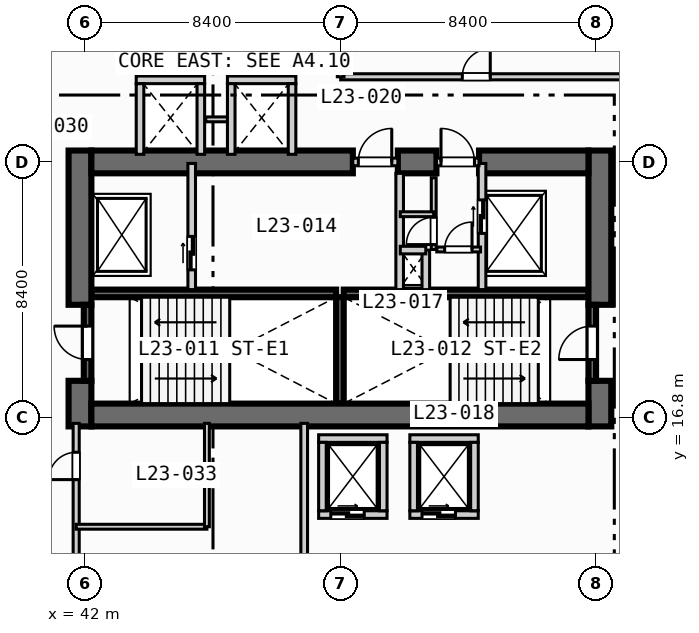
"""IFC4 building model, lengths in metres.
Left out: names, types, materials, properties, quantities, classifications, styles, units other than length and angle.
Written with IfcOpenShell. Run it as: python <this file> out.ifc"""

import sys

from ifc_helpers import new_model, si_unit, direction, frame, frame_2d, origin, place, context, subcontext, project, spatial, rectangle, extrude, element, fill, save


model = new_model("IFC4")
c1 = context("Model", 3, precision=1e-05, world=origin(), true_north=direction((0.0, 1.0)))
c2 = subcontext(c1, "Body", "Model", "MODEL_VIEW")
j1 = project(units=[si_unit("LENGTHUNIT", "METRE"), si_unit("PLANEANGLEUNIT", "RADIAN")], contexts=[c1])
p1 = place(None, origin())
s1 = spatial("IfcSite", under=j1, at=p1, CompositionType="ELEMENT")
p2 = place(p1, origin())
s2 = spatial("IfcBuilding", under=s1, at=p2, CompositionType="ELEMENT")
p3 = place(p2, frame((0.0, 0.0, 100.0)))
s3 = spatial("IfcBuildingStorey", under=s2, at=p3, CompositionType="ELEMENT", Elevation=100.0)
for number, where, z_axis, x_axis in (
    (1, (42.2, 20.875, 0.0), (0.0, 0.0, 1.0), (1.0, 0.0, 0.0)),
    (2, (50.5, 20.875, 0.0), (0.0, 0.0, 1.0), (1.0, 0.0, 0.0)),
):
    element("IfcWall", number, at=place(p3, frame(where, z_axis=z_axis, x_axis=x_axis)), inside=s3, PredefinedType="SOLIDWALL", context=c2, shape_type="SweptSolid", body=[
        extrude(rectangle(XDim=8.05, YDim=0.25, at=frame_2d((4.025, 0.0))), origin(), (0.0, 0.0, 1.0), 3.55),
    ])
p4 = place(p3, frame((50.375, 17.25, 0.0), z_axis=(0.0, 0.0, 1.0), x_axis=(0.0, 1.0, 0.0)))
e3 = element("IfcWall", 3, at=p4, inside=s3, PredefinedType="SOLIDWALL", context=c2, shape_type="SweptSolid", body=[
    extrude(rectangle(XDim=3.5, YDim=0.25, at=frame_2d((1.75, 0.0))), origin(), (0.0, 0.0, 1.0), 3.55),
])
p5 = place(p3, frame((41.825, 16.5, 0.0), z_axis=(0.0, 0.0, 1.0), x_axis=(0.0, 1.0, 0.0)))
e4 = element("IfcWall", 4, at=p5, inside=s3, PredefinedType="SHEAR", context=c2, shape_type="SweptSolid", body=[
    extrude(rectangle(XDim=1.5, YDim=0.75, at=frame_2d((0.75, 0.0))), origin(), (0.0, 0.0, 1.0), 3.55),
])
p6 = place(p3, frame((41.825, 20.5, 0.0), z_axis=(0.0, 0.0, 1.0), x_axis=(0.0, 1.0, 0.0)))
e5 = element("IfcWall", 5, at=p6, inside=s3, PredefinedType="SHEAR", context=c2, shape_type="SweptSolid", body=[
    extrude(rectangle(XDim=5.075, YDim=0.75, at=frame_2d((2.538, 0.0))), origin(), (0.0, 0.0, 1.0), 3.55),
])
p7 = place(p3, frame((58.925, 16.5, 0.0), z_axis=(0.0, 0.0, 1.0), x_axis=(0.0, 1.0, 0.0)))
e6 = element("IfcWall", 6, at=p7, inside=s3, PredefinedType="SHEAR", context=c2, shape_type="SweptSolid", body=[
    extrude(rectangle(XDim=1.5, YDim=0.75, at=frame_2d((0.75, 0.0))), origin(), (0.0, 0.0, 1.0), 3.55),
])
p8 = place(p3, frame((58.925, 20.5, 0.0), z_axis=(0.0, 0.0, 1.0), x_axis=(0.0, 1.0, 0.0)))
e7 = element("IfcWall", 7, at=p8, inside=s3, PredefinedType="SHEAR", context=c2, shape_type="SweptSolid", body=[
    extrude(rectangle(XDim=5.075, YDim=0.75, at=frame_2d((2.538, 0.0))), origin(), (0.0, 0.0, 1.0), 3.55),
])
p9 = place(p3, frame((42.2, 16.875, 0.0), z_axis=(0.0, 0.0, 1.0), x_axis=(1.0, 0.0, 0.0)))
e8 = element("IfcWall", 8, at=p9, inside=s3, PredefinedType="SHEAR", context=c2, shape_type="SweptSolid", body=[
    extrude(rectangle(XDim=16.35, YDim=0.75, at=frame_2d((8.175, 0.0))), origin(), (0.0, 0.0, 1.0), 3.55),
])
p10 = place(p3, frame((42.2, 25.2, 0.0), z_axis=(0.0, 0.0, 1.0), x_axis=(1.0, 0.0, 0.0)))
e9 = element("IfcWall", 9, at=p10, inside=s3, PredefinedType="SHEAR", context=c2, shape_type="SweptSolid", body=[
    extrude(rectangle(XDim=8.6, YDim=0.75, at=frame_2d((4.3, 0.0))), origin(), (0.0, 0.0, 1.0), 3.55),
])
p11 = place(p3, frame((52.28, 25.2, 0.0), z_axis=(0.0, 0.0, 1.0), x_axis=(1.0, 0.0, 0.0)))
e10 = element("IfcWall", 10, at=p11, inside=s3, PredefinedType="SHEAR", context=c2, shape_type="SweptSolid", body=[
    extrude(rectangle(XDim=1.27, YDim=0.75, at=frame_2d((0.635, 0.0))), origin(), (0.0, 0.0, 1.0), 3.55),
])
p12 = place(p3, frame((54.95, 25.2, 0.0), z_axis=(0.0, 0.0, 1.0), x_axis=(1.0, 0.0, 0.0)))
e11 = element("IfcWall", 11, at=p12, inside=s3, PredefinedType="SHEAR", context=c2, shape_type="SweptSolid", body=[
    extrude(rectangle(XDim=3.6, YDim=0.75, at=frame_2d((1.8, 0.0))), origin(), (0.0, 0.0, 1.0), 3.55),
])
p13 = place(p3, frame((42.075, 18.0, 0.0), z_axis=(0.0, 0.0, 1.0), x_axis=(0.0, 1.0, 0.0)))
e12 = element("IfcWall", 12, at=p13, inside=s3, PredefinedType="SOLIDWALL", context=c2, shape_type="SweptSolid", body=[
    extrude(rectangle(XDim=2.5, YDim=0.25, at=frame_2d((1.25, 0.0))), origin(), (0.0, 0.0, 1.0), 3.55),
])
p14 = place(p13, frame((0.7, 0.0, 0.0)))
e13 = element("IfcOpeningElement", 13, at=p14, cuts=e12, PredefinedType="OPENING", context=c2, shape_type="SweptSolid", body=[
    extrude(rectangle(XDim=1.1, YDim=2.15, at=frame_2d((0.55, 1.075))), frame((0.0, 0.135, 0.0), z_axis=(0.0, -1.0, 0.0), x_axis=(1.0, 0.0, 0.0)), (0.0, 0.0, 1.0), 0.27),
])
p15 = place(p3, frame((58.675, 18.0, 0.0), z_axis=(0.0, 0.0, 1.0), x_axis=(0.0, 1.0, 0.0)))
e14 = element("IfcWall", 14, at=p15, inside=s3, PredefinedType="SOLIDWALL", context=c2, shape_type="SweptSolid", body=[
    extrude(rectangle(XDim=2.5, YDim=0.25, at=frame_2d((1.25, 0.0))), origin(), (0.0, 0.0, 1.0), 3.55),
])
p16 = place(p15, frame((0.7, 0.0, 0.0)))
e15 = element("IfcOpeningElement", 15, at=p16, cuts=e14, PredefinedType="OPENING", context=c2, shape_type="SweptSolid", body=[
    extrude(rectangle(XDim=1.1, YDim=2.15, at=frame_2d((0.55, 1.075))), frame((0.0, 0.135, 0.0), z_axis=(0.0, -1.0, 0.0), x_axis=(1.0, 0.0, 0.0)), (0.0, 0.0, 1.0), 0.27),
])
p17 = place(p3, frame((45.5, 21.0, 0.0), z_axis=(0.0, 0.0, 1.0), x_axis=(0.0, 1.0, 0.0)))
e16 = element("IfcWall", 16, at=p17, inside=s3, PredefinedType="SOLIDWALL", context=c2, shape_type="SweptSolid", body=[
    extrude(rectangle(XDim=4.15, YDim=0.25, at=frame_2d((2.075, 0.0))), origin(), (0.0, 0.0, 1.0), 3.55),
])
p18 = place(p17, frame((0.65, 0.0, 0.0)))
e17 = element("IfcOpeningElement", 17, at=p18, cuts=e16, PredefinedType="OPENING", context=c2, shape_type="SweptSolid", body=[
    extrude(rectangle(XDim=1.1, YDim=2.15, at=frame_2d((0.55, 1.075))), frame((0.0, 0.135, 0.0), z_axis=(0.0, -1.0, 0.0), x_axis=(1.0, 0.0, 0.0)), (0.0, 0.0, 1.0), 0.27),
])
p19 = place(p3, frame((50.8, 25.2, 0.0), z_axis=(0.0, 0.0, 1.0), x_axis=(1.0, 0.0, 0.0)))
e18 = element("IfcWall", 18, at=p19, inside=s3, PredefinedType="SOLIDWALL", context=c2, shape_type="SweptSolid", body=[
    extrude(rectangle(XDim=1.48, YDim=0.25, at=frame_2d((0.74, 0.0))), origin(), (0.0, 0.0, 1.0), 3.55),
])
p20 = place(p19, frame((0.18, 0.0, 0.0)))
e19 = element("IfcOpeningElement", 19, at=p20, cuts=e18, PredefinedType="OPENING", context=c2, shape_type="SweptSolid", body=[
    extrude(rectangle(XDim=1.1, YDim=2.15, at=frame_2d((0.55, 1.075))), frame((0.0, 0.135, 0.0), z_axis=(0.0, -1.0, 0.0), x_axis=(1.0, 0.0, 0.0)), (0.0, 0.0, 1.0), 0.27),
])
p21 = place(p3, frame((52.34, 21.0, 0.0), z_axis=(0.0, 0.0, 1.0), x_axis=(0.0, 1.0, 0.0)))
e20 = element("IfcWall", 20, at=p21, inside=s3, PredefinedType="SOLIDWALL", context=c2, shape_type="SweptSolid", body=[
    extrude(rectangle(XDim=3.825, YDim=0.25, at=frame_2d((1.913, 0.0))), origin(), (0.0, 0.0, 1.0), 3.55),
])
p22 = place(p3, frame((55.05, 21.0, 0.0), z_axis=(0.0, 0.0, 1.0), x_axis=(0.0, 1.0, 0.0)))
e21 = element("IfcWall", 21, at=p22, inside=s3, PredefinedType="SOLIDWALL", context=c2, shape_type="SweptSolid", body=[
    extrude(rectangle(XDim=4.15, YDim=0.25, at=frame_2d((2.075, 0.0))), origin(), (0.0, 0.0, 1.0), 3.55),
])
p23 = place(p22, frame((1.85, 0.0, 0.0)))
e22 = element("IfcOpeningElement", 22, at=p23, cuts=e21, PredefinedType="OPENING", context=c2, shape_type="SweptSolid", body=[
    extrude(rectangle(XDim=1.1, YDim=2.15, at=frame_2d((0.55, 1.075))), frame((0.0, 0.135, 0.0), z_axis=(0.0, -1.0, 0.0), x_axis=(1.0, 0.0, 0.0)), (0.0, 0.0, 1.0), 0.27),
])
p24 = place(p3, frame((53.55, 25.2, 0.0), z_axis=(0.0, 0.0, 1.0), x_axis=(1.0, 0.0, 0.0)))
e23 = element("IfcWall", 23, at=p24, inside=s3, PredefinedType="SOLIDWALL", context=c2, shape_type="SweptSolid", body=[
    extrude(rectangle(XDim=1.4, YDim=0.25, at=frame_2d((0.7, 0.0))), origin(), (0.0, 0.0, 1.0), 3.55),
])
p25 = place(p24, frame((0.15, 0.0, 0.0)))
e24 = element("IfcOpeningElement", 24, at=p25, cuts=e23, PredefinedType="OPENING", context=c2, shape_type="SweptSolid", body=[
    extrude(rectangle(XDim=1.1, YDim=2.15, at=frame_2d((0.55, 1.075))), frame((0.0, 0.135, 0.0), z_axis=(0.0, -1.0, 0.0), x_axis=(1.0, 0.0, 0.0)), (0.0, 0.0, 1.0), 0.27),
])
p26 = place(p3, frame((53.2, 21.0, 0.0), z_axis=(0.0, 0.0, 1.0), x_axis=(0.0, 1.0, 0.0)))
e25 = element("IfcWall", 25, at=p26, inside=s3, PredefinedType="SOLIDWALL", context=c2, shape_type="SweptSolid", body=[
    extrude(rectangle(XDim=1.3, YDim=0.25, at=frame_2d((0.65, 0.0))), origin(), (0.0, 0.0, 1.0), 3.55),
])
p27 = place(p3, frame((52.36, 22.3, 0.0), z_axis=(0.0, 0.0, 1.0), x_axis=(1.0, 0.0, 0.0)))
e26 = element("IfcWall", 26, at=p27, inside=s3, PredefinedType="SOLIDWALL", context=c2, shape_type="SweptSolid", body=[
    extrude(rectangle(XDim=0.84, YDim=0.25, at=frame_2d((0.42, 0.0))), origin(), (0.0, 0.0, 1.0), 3.55),
])
p28 = place(p3, frame((53.56, 22.32, 0.0), z_axis=(0.0, 0.0, 1.0), x_axis=(1.0, 0.0, 0.0)))
e27 = element("IfcWall", 27, at=p28, inside=s3, PredefinedType="PARTITIONING", context=c2, shape_type="SweptSolid", body=[
    extrude(rectangle(XDim=1.44, YDim=0.16, at=frame_2d((0.72, 0.0))), origin(), (0.0, 0.0, 1.0), 3.55),
])
p29 = place(p28, frame((0.26, 0.0, 0.0)))
e28 = element("IfcOpeningElement", 28, at=p29, cuts=e27, PredefinedType="OPENING", context=c2, shape_type="SweptSolid", body=[
    extrude(rectangle(XDim=0.9, YDim=2.1, at=frame_2d((0.45, 1.05))), frame((0.0, 0.09, 0.0), z_axis=(0.0, -1.0, 0.0), x_axis=(1.0, 0.0, 0.0)), (0.0, 0.0, 1.0), 0.18),
])
p30 = place(p3, frame((53.46, 22.32, 0.0), z_axis=(0.0, 0.0, 1.0), x_axis=(0.0, 1.0, 0.0)))
e29 = element("IfcWall", 29, at=p30, inside=s3, PredefinedType="PARTITIONING", context=c2, shape_type="SweptSolid", body=[
    extrude(rectangle(XDim=2.36, YDim=0.16, at=frame_2d((1.18, 0.0))), origin(), (0.0, 0.0, 1.0), 3.55),
])
p31 = place(p30, frame((0.16, 0.0, 0.0)))
e30 = element("IfcOpeningElement", 30, at=p31, cuts=e29, PredefinedType="OPENING", context=c2, shape_type="SweptSolid", body=[
    extrude(rectangle(XDim=0.9, YDim=2.1, at=frame_2d((0.45, 1.05))), frame((0.0, 0.09, 0.0), z_axis=(0.0, -1.0, 0.0), x_axis=(1.0, 0.0, 0.0)), (0.0, 0.0, 1.0), 0.18),
])
p32 = place(p3, frame((52.36, 23.48, 0.0), z_axis=(0.0, 0.0, 1.0), x_axis=(1.0, 0.0, 0.0)))
e31 = element("IfcWall", 31, at=p32, inside=s3, PredefinedType="PARTITIONING", context=c2, shape_type="SweptSolid", body=[
    extrude(rectangle(XDim=1.1, YDim=0.16, at=frame_2d((0.55, 0.0))), origin(), (0.0, 0.0, 1.0), 3.55),
])
p33 = place(p3, frame((49.675, 13.6, 0.0), z_axis=(0.0, 0.0, 1.0), x_axis=(1.0, 0.0, 0.0)))
e32 = element("IfcWall", 32, at=p33, inside=s3, PredefinedType="SOLIDWALL", context=c2, shape_type="SweptSolid", body=[
    extrude(rectangle(XDim=2.25, YDim=0.25, at=frame_2d((1.125, 0.0))), origin(), (0.0, 0.0, 1.0), 3.55),
])
p34 = place(p33, frame((0.4, 0.0, 0.0)))
e33 = element("IfcOpeningElement", 33, at=p34, cuts=e32, PredefinedType="OPENING", context=c2, shape_type="SweptSolid", body=[
    extrude(rectangle(XDim=1.1, YDim=2.15, at=frame_2d((0.55, 1.075))), frame((0.0, 0.135, 0.0), z_axis=(0.0, -1.0, 0.0), x_axis=(1.0, 0.0, 0.0)), (0.0, 0.0, 1.0), 0.27),
])
for number, where, z_axis, x_axis in (
    (34, (49.675, 16.1, 0.0), (0.0, 0.0, 1.0), (1.0, 0.0, 0.0)),
    (35, (49.8, 13.725, 0.0), (0.0, 0.0, 1.0), (0.0, 1.0, 0.0)),
    (36, (51.8, 13.725, 0.0), (0.0, 0.0, 1.0), (0.0, 1.0, 0.0)),
):
    element("IfcWall", number, at=place(p3, frame(where, z_axis=z_axis, x_axis=x_axis)), inside=s3, PredefinedType="SOLIDWALL", context=c2, shape_type="SweptSolid", body=[
        extrude(rectangle(XDim=2.25, YDim=0.25, at=frame_2d((1.125, 0.0))), origin(), (0.0, 0.0, 1.0), 3.55),
    ])
p35 = place(p3, frame((52.675, 13.6, 0.0), z_axis=(0.0, 0.0, 1.0), x_axis=(1.0, 0.0, 0.0)))
e37 = element("IfcWall", 37, at=p35, inside=s3, PredefinedType="SOLIDWALL", context=c2, shape_type="SweptSolid", body=[
    extrude(rectangle(XDim=2.25, YDim=0.25, at=frame_2d((1.125, 0.0))), origin(), (0.0, 0.0, 1.0), 3.55),
])
p36 = place(p35, frame((0.4, 0.0, 0.0)))
e38 = element("IfcOpeningElement", 38, at=p36, cuts=e37, PredefinedType="OPENING", context=c2, shape_type="SweptSolid", body=[
    extrude(rectangle(XDim=1.1, YDim=2.15, at=frame_2d((0.55, 1.075))), frame((0.0, 0.135, 0.0), z_axis=(0.0, -1.0, 0.0), x_axis=(1.0, 0.0, 0.0)), (0.0, 0.0, 1.0), 0.27),
])
for number, where, z_axis, x_axis in (
    (39, (52.675, 16.1, 0.0), (0.0, 0.0, 1.0), (1.0, 0.0, 0.0)),
    (40, (52.8, 13.725, 0.0), (0.0, 0.0, 1.0), (0.0, 1.0, 0.0)),
    (41, (54.8, 13.725, 0.0), (0.0, 0.0, 1.0), (0.0, 1.0, 0.0)),
    (42, (43.675, 27.9, 0.0), (0.0, 0.0, 1.0), (1.0, 0.0, 0.0)),
):
    element("IfcWall", number, at=place(p3, frame(where, z_axis=z_axis, x_axis=x_axis)), inside=s3, PredefinedType="SOLIDWALL", context=c2, shape_type="SweptSolid", body=[
        extrude(rectangle(XDim=2.25, YDim=0.25, at=frame_2d((1.125, 0.0))), origin(), (0.0, 0.0, 1.0), 3.55),
    ])
for number, where, z_axis, x_axis in (
    (43, (43.8, 25.45, 0.0), (0.0, 0.0, 1.0), (0.0, 1.0, 0.0)),
    (44, (45.8, 25.45, 0.0), (0.0, 0.0, 1.0), (0.0, 1.0, 0.0)),
):
    element("IfcWall", number, at=place(p3, frame(where, z_axis=z_axis, x_axis=x_axis)), inside=s3, PredefinedType="SOLIDWALL", context=c2, shape_type="SweptSolid", body=[
        extrude(rectangle(XDim=2.325, YDim=0.25, at=frame_2d((1.163, 0.0))), origin(), (0.0, 0.0, 1.0), 3.55),
    ])
p37 = place(p3, frame((45.96, 26.6, 0.0), z_axis=(0.0, 0.0, 1.0), x_axis=(1.0, 0.0, 0.0)))
e45 = element("IfcWall", 45, at=p37, inside=s3, PredefinedType="PARTITIONING", context=c2, shape_type="SweptSolid", body=[
    extrude(rectangle(XDim=0.88, YDim=0.16, at=frame_2d((0.44, 0.0))), origin(), (0.0, 0.0, 1.0), 3.55),
])
p38 = place(p3, frame((46.675, 27.9, 0.0), z_axis=(0.0, 0.0, 1.0), x_axis=(1.0, 0.0, 0.0)))
e46 = element("IfcWall", 46, at=p38, inside=s3, PredefinedType="SOLIDWALL", context=c2, shape_type="SweptSolid", body=[
    extrude(rectangle(XDim=2.25, YDim=0.25, at=frame_2d((1.125, 0.0))), origin(), (0.0, 0.0, 1.0), 3.55),
])
for number, where, z_axis, x_axis in (
    (47, (46.8, 25.45, 0.0), (0.0, 0.0, 1.0), (0.0, 1.0, 0.0)),
    (48, (48.8, 25.45, 0.0), (0.0, 0.0, 1.0), (0.0, 1.0, 0.0)),
):
    element("IfcWall", number, at=place(p3, frame(where, z_axis=z_axis, x_axis=x_axis)), inside=s3, PredefinedType="SOLIDWALL", context=c2, shape_type="SweptSolid", body=[
        extrude(rectangle(XDim=2.325, YDim=0.25, at=frame_2d((1.163, 0.0))), origin(), (0.0, 0.0, 1.0), 3.55),
    ])
p39 = place(p3, frame((41.7, 0.35, 0.0), z_axis=(0.0, 0.0, 1.0), x_axis=(0.0, 1.0, 0.0)))
e49 = element("IfcWall", 49, at=p39, inside=s3, PredefinedType="PARTITIONING", context=c2, shape_type="SweptSolid", body=[
    extrude(rectangle(XDim=16.25, YDim=0.2, at=frame_2d((8.125, 0.0))), origin(), (0.0, 0.0, 1.0), 2.8),
])
p40 = place(p39, frame((5.0, 0.0, 0.0)))
e50 = element("IfcOpeningElement", 50, at=p40, cuts=e49, PredefinedType="OPENING", context=c2, shape_type="SweptSolid", body=[
    extrude(rectangle(XDim=0.92, YDim=2.1, at=frame_2d((0.46, 1.05))), frame((0.0, 0.11, 0.0), z_axis=(0.0, -1.0, 0.0), x_axis=(1.0, 0.0, 0.0)), (0.0, 0.0, 1.0), 0.22),
])
p41 = place(p39, frame((14.4, 0.0, 0.0)))
e51 = element("IfcOpeningElement", 51, at=p41, cuts=e49, PredefinedType="OPENING", context=c2, shape_type="SweptSolid", body=[
    extrude(rectangle(XDim=0.9, YDim=2.1, at=frame_2d((0.45, 1.05))), frame((0.0, 0.11, 0.0), z_axis=(0.0, -1.0, 0.0), x_axis=(1.0, 0.0, 0.0)), (0.0, 0.0, 1.0), 0.22),
])
p42 = place(p3, frame((49.2, 0.35, 0.0), z_axis=(0.0, 0.0, 1.0), x_axis=(0.0, 1.0, 0.0)))
e52 = element("IfcWall", 52, at=p42, inside=s3, PredefinedType="PARTITIONING", context=c2, shape_type="SweptSolid", body=[
    extrude(rectangle(XDim=16.25, YDim=0.22, at=frame_2d((8.125, 0.0))), origin(), (0.0, 0.0, 1.0), 3.55),
])
p43 = place(p3, frame((41.7, 13.2, 0.0), z_axis=(0.0, 0.0, 1.0), x_axis=(1.0, 0.0, 0.0)))
e53 = element("IfcWall", 53, at=p43, inside=s3, PredefinedType="PARTITIONING", context=c2, shape_type="SweptSolid", body=[
    extrude(rectangle(XDim=4.3, YDim=0.16, at=frame_2d((2.15, 0.0))), origin(), (0.0, 0.0, 1.0), 3.55),
])
p44 = place(p3, frame((46.0, 13.2, 0.0), z_axis=(0.0, 0.0, 1.0), x_axis=(0.0, 1.0, 0.0)))
e54 = element("IfcWall", 54, at=p44, inside=s3, PredefinedType="PARTITIONING", context=c2, shape_type="SweptSolid", body=[
    extrude(rectangle(XDim=3.4, YDim=0.16, at=frame_2d((1.7, 0.0))), origin(), (0.0, 0.0, 1.0), 3.55),
])
p45 = place(p3, frame((50.4, 28.0, 0.0), z_axis=(0.0, 0.0, 1.0), x_axis=(1.0, 0.0, 0.0)))
e55 = element("IfcWall", 55, at=p45, inside=s3, PredefinedType="PARTITIONING", context=c2, shape_type="SweptSolid", body=[
    extrude(rectangle(XDim=21.8, YDim=0.2, at=frame_2d((10.9, 0.0))), origin(), (0.0, 0.0, 1.0), 3.55),
])
p46 = place(p45, frame((4.0, 0.0, 0.0)))
e56 = element("IfcOpeningElement", 56, at=p46, cuts=e55, PredefinedType="OPENING", context=c2, shape_type="SweptSolid", body=[
    extrude(rectangle(XDim=0.92, YDim=2.1, at=frame_2d((0.46, 1.05))), frame((0.0, 0.11, 0.0), z_axis=(0.0, -1.0, 0.0), x_axis=(1.0, 0.0, 0.0)), (0.0, 0.0, 1.0), 0.22),
])
p47 = place(p3, frame((50.4, 28.0, 0.0), z_axis=(0.0, 0.0, 1.0), x_axis=(0.0, 1.0, 0.0)))
e57 = element("IfcWall", 57, at=p47, inside=s3, PredefinedType="PARTITIONING", context=c2, shape_type="SweptSolid", body=[
    extrude(rectangle(XDim=5.3, YDim=0.22, at=frame_2d((2.65, 0.0))), origin(), (0.0, 0.0, 1.0), 3.087),
])
p48 = place(p14, origin())
e58 = element("IfcDoor", 58, at=p48, inside=s3, OperationType="SINGLE_SWING_RIGHT", PredefinedType="DOOR", context=c2, shape_type="SweptSolid", body=[
    extrude(rectangle(XDim=1.1, YDim=2.15, at=frame_2d((0.55, 1.075))), frame((0.0, 0.025, 0.0), z_axis=(0.0, -1.0, 0.0), x_axis=(1.0, 0.0, 0.0)), (0.0, 0.0, 1.0), 0.05),
])
fill(e13, e58)
p49 = place(p16, origin())
e59 = element("IfcDoor", 59, at=p49, inside=s3, OperationType="SINGLE_SWING_LEFT", PredefinedType="DOOR", context=c2, shape_type="SweptSolid", body=[
    extrude(rectangle(XDim=1.1, YDim=2.15, at=frame_2d((0.55, 1.075))), frame((0.0, 0.025, 0.0), z_axis=(0.0, -1.0, 0.0), x_axis=(1.0, 0.0, 0.0)), (0.0, 0.0, 1.0), 0.05),
])
fill(e15, e59)
p50 = place(p18, origin())
e60 = element("IfcDoor", 60, at=p50, inside=s3, OperationType="SLIDING_TO_LEFT", PredefinedType="DOOR", context=c2, shape_type="SweptSolid", body=[
    extrude(rectangle(XDim=1.1, YDim=2.15, at=frame_2d((0.55, 1.075))), frame((0.0, 0.025, 0.0), z_axis=(0.0, -1.0, 0.0), x_axis=(1.0, 0.0, 0.0)), (0.0, 0.0, 1.0), 0.05),
])
fill(e17, e60)
p51 = place(p20, origin())
e61 = element("IfcDoor", 61, at=p51, inside=s3, OperationType="SINGLE_SWING_RIGHT", PredefinedType="DOOR", context=c2, shape_type="SweptSolid", body=[
    extrude(rectangle(XDim=1.1, YDim=2.15, at=frame_2d((0.55, 1.075))), frame((0.0, 0.025, 0.0), z_axis=(0.0, -1.0, 0.0), x_axis=(1.0, 0.0, 0.0)), (0.0, 0.0, 1.0), 0.05),
])
fill(e19, e61)
p52 = place(p23, origin())
e62 = element("IfcDoor", 62, at=p52, inside=s3, OperationType="SLIDING_TO_LEFT", PredefinedType="DOOR", context=c2, shape_type="SweptSolid", body=[
    extrude(rectangle(XDim=1.1, YDim=2.15, at=frame_2d((0.55, 1.075))), frame((0.0, 0.025, 0.0), z_axis=(0.0, -1.0, 0.0), x_axis=(1.0, 0.0, 0.0)), (0.0, 0.0, 1.0), 0.05),
])
fill(e22, e62)
p53 = place(p25, origin())
e63 = element("IfcDoor", 63, at=p53, inside=s3, OperationType="SINGLE_SWING_LEFT", PredefinedType="DOOR", context=c2, shape_type="SweptSolid", body=[
    extrude(rectangle(XDim=1.1, YDim=2.15, at=frame_2d((0.55, 1.075))), frame((0.0, 0.025, 0.0), z_axis=(0.0, -1.0, 0.0), x_axis=(1.0, 0.0, 0.0)), (0.0, 0.0, 1.0), 0.05),
])
fill(e24, e63)
p54 = place(p29, origin())
e64 = element("IfcDoor", 64, at=p54, inside=s3, OperationType="SINGLE_SWING_RIGHT", PredefinedType="DOOR", context=c2, shape_type="SweptSolid", body=[
    extrude(rectangle(XDim=0.9, YDim=2.1, at=frame_2d((0.45, 1.05))), frame((0.0, 0.025, 0.0), z_axis=(0.0, -1.0, 0.0), x_axis=(1.0, 0.0, 0.0)), (0.0, 0.0, 1.0), 0.05),
])
fill(e28, e64)
p55 = place(p31, origin())
e65 = element("IfcDoor", 65, at=p55, inside=s3, OperationType="SINGLE_SWING_LEFT", PredefinedType="DOOR", context=c2, shape_type="SweptSolid", body=[
    extrude(rectangle(XDim=0.9, YDim=2.1, at=frame_2d((0.45, 1.05))), frame((0.0, 0.025, 0.0), z_axis=(0.0, -1.0, 0.0), x_axis=(1.0, 0.0, 0.0)), (0.0, 0.0, 1.0), 0.05),
])
fill(e30, e65)
p56 = place(p34, origin())
e66 = element("IfcDoor", 66, at=p56, inside=s3, OperationType="SLIDING_TO_LEFT", PredefinedType="DOOR", context=c2, shape_type="SweptSolid", body=[
    extrude(rectangle(XDim=1.1, YDim=2.15, at=frame_2d((0.55, 1.075))), frame((0.0, 0.025, 0.0), z_axis=(0.0, -1.0, 0.0), x_axis=(1.0, 0.0, 0.0)), (0.0, 0.0, 1.0), 0.05),
])
fill(e33, e66)
p57 = place(p36, origin())
e67 = element("IfcDoor", 67, at=p57, inside=s3, OperationType="SLIDING_TO_LEFT", PredefinedType="DOOR", context=c2, shape_type="SweptSolid", body=[
    extrude(rectangle(XDim=1.1, YDim=2.15, at=frame_2d((0.55, 1.075))), frame((0.0, 0.025, 0.0), z_axis=(0.0, -1.0, 0.0), x_axis=(1.0, 0.0, 0.0)), (0.0, 0.0, 1.0), 0.05),
])
fill(e38, e67)
p58 = place(p41, origin())
e68 = element("IfcDoor", 68, at=p58, inside=s3, OperationType="SINGLE_SWING_LEFT", PredefinedType="DOOR", context=c2, shape_type="SweptSolid", body=[
    extrude(rectangle(XDim=0.9, YDim=2.1, at=frame_2d((0.45, 1.05))), frame((0.0, 0.025, 0.0), z_axis=(0.0, -1.0, 0.0), x_axis=(1.0, 0.0, 0.0)), (0.0, 0.0, 1.0), 0.05),
])
fill(e51, e68)
p59 = place(p46, origin())
e69 = element("IfcDoor", 69, at=p59, inside=s3, OperationType="SINGLE_SWING_RIGHT", PredefinedType="DOOR", context=c2, shape_type="SweptSolid", body=[
    extrude(rectangle(XDim=0.92, YDim=2.1, at=frame_2d((0.46, 1.05))), frame((0.0, 0.025, 0.0), z_axis=(0.0, -1.0, 0.0), x_axis=(1.0, 0.0, 0.0)), (0.0, 0.0, 1.0), 0.05),
])
fill(e56, e69)
save(model, sys.argv[1])
